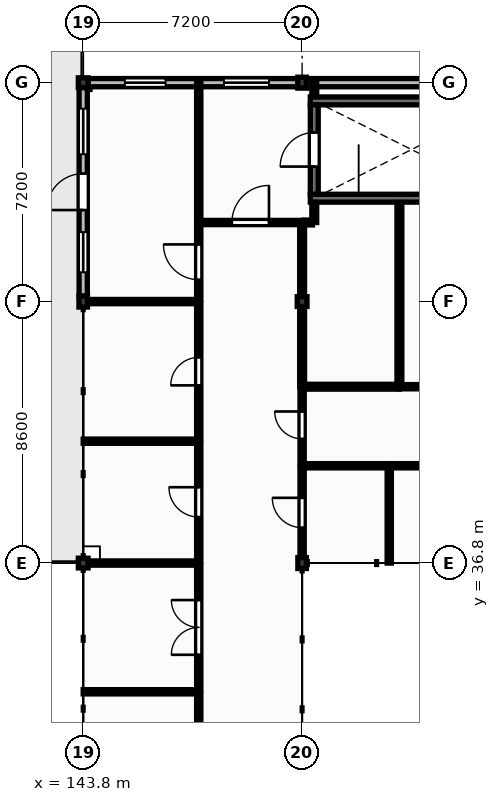
"""IFC4 building model, lengths in metres.
Left out: names, types, materials, properties, quantities, classifications, styles, units other than length and angle.
Written with IfcOpenShell. Run it as: python <this file> out.ifc"""

import sys

from ifc_helpers import new_model, si_unit, direction, frame, frame_2d, origin, origin_2d, place, context, subcontext, project, spatial, rectangle, extrude, element, fill, save


model = new_model("IFC4")
c1 = context("Model", 3, precision=1e-05, world=origin(), true_north=direction((0.0, 1.0)))
c2 = subcontext(c1, "Body", "Model", "MODEL_VIEW")
j1 = project(units=[si_unit("LENGTHUNIT", "METRE"), si_unit("PLANEANGLEUNIT", "RADIAN")], contexts=[c1])
p1 = place(None, origin())
s1 = spatial("IfcSite", under=j1, at=p1, CompositionType="ELEMENT")
p2 = place(p1, origin())
s2 = spatial("IfcBuilding", under=s1, at=p2, CompositionType="ELEMENT")
p3 = place(p2, frame((0.0, 0.0, 9.0)))
s3 = spatial("IfcBuildingStorey", under=s2, at=p3, CompositionType="ELEMENT", Elevation=9.0)
p4 = place(p3, frame((143.8, 36.8, 0.0), z_axis=(0.0, 0.0, 1.0), x_axis=(1.0, 0.0, 0.0)))
e1 = element("IfcColumn", 1, at=p4, inside=s3, PredefinedType="COLUMN", context=c2, shape_type="SweptSolid", body=[
    extrude(rectangle(XDim=0.32, YDim=0.32, at=origin_2d()), origin(), (0.0, 0.0, 1.0), 3.98),
])
p5 = place(p3, frame((143.8, 45.4, 0.0), z_axis=(0.0, 0.0, 1.0), x_axis=(1.0, 0.0, 0.0)))
e2 = element("IfcColumn", 2, at=p5, inside=s3, PredefinedType="COLUMN", context=c2, shape_type="SweptSolid", body=[
    extrude(rectangle(XDim=0.28, YDim=0.36, at=origin_2d()), origin(), (0.0, 0.0, 1.0), 3.98),
])
p6 = place(p3, frame((143.8, 52.6, 0.0), z_axis=(0.0, 0.0, 1.0), x_axis=(1.0, 0.0, 0.0)))
e3 = element("IfcColumn", 3, at=p6, inside=s3, PredefinedType="COLUMN", context=c2, shape_type="SweptSolid", body=[
    extrude(rectangle(XDim=0.32, YDim=0.32, at=origin_2d()), origin(), (0.0, 0.0, 1.0), 3.98),
])
p7 = place(p3, frame((151.0, 36.8, 0.0), z_axis=(0.0, 0.0, 1.0), x_axis=(1.0, 0.0, 0.0)))
e4 = element("IfcColumn", 4, at=p7, inside=s3, PredefinedType="COLUMN", context=c2, shape_type="SweptSolid", body=[
    extrude(rectangle(XDim=0.28, YDim=0.36, at=origin_2d()), origin(), (0.0, 0.0, 1.0), 5.775),
])
p8 = place(p3, frame((151.0, 45.4, 0.0), z_axis=(0.0, 0.0, 1.0), x_axis=(1.0, 0.0, 0.0)))
e5 = element("IfcColumn", 5, at=p8, inside=s3, PredefinedType="COLUMN", context=c2, shape_type="SweptSolid", body=[
    extrude(rectangle(XDim=0.32, YDim=0.32, at=origin_2d()), origin(), (0.0, 0.0, 1.0), 5.775),
])
p9 = place(p3, frame((151.0, 52.6, 0.0), z_axis=(0.0, 0.0, 1.0), x_axis=(1.0, 0.0, 0.0)))
e6 = element("IfcColumn", 6, at=p9, inside=s3, PredefinedType="COLUMN", context=c2, shape_type="SweptSolid", body=[
    extrude(rectangle(XDim=0.28, YDim=0.36, at=origin_2d()), origin(), (0.0, 0.0, 1.0), 5.775),
])
p10 = place(p3, frame((143.96, 52.6, 0.0), z_axis=(0.0, 0.0, 1.0), x_axis=(1.0, 0.0, 0.0)))
e7 = element("IfcWall", 7, at=p10, inside=s3, PredefinedType="SOLIDWALL", context=c2, shape_type="SweptSolid", body=[
    extrude(rectangle(XDim=6.9, YDim=0.27, at=frame_2d((3.45, 0.0))), origin(), (0.0, 0.0, 1.0), 3.54),
])
p11 = place(p10, frame((1.21, 0.0, 1.0)))
e8 = element("IfcOpeningElement", 8, at=p11, cuts=e7, PredefinedType="OPENING", context=c2, shape_type="SweptSolid", body=[
    extrude(rectangle(XDim=1.34, YDim=1.95, at=frame_2d((0.67, 0.975))), frame((0.0, 0.145, 0.0), z_axis=(0.0, -1.0, 0.0), x_axis=(1.0, 0.0, 0.0)), (0.0, 0.0, 1.0), 0.29),
])
p12 = place(p10, frame((4.47, 0.0, 1.0)))
e9 = element("IfcOpeningElement", 9, at=p12, cuts=e7, PredefinedType="OPENING", context=c2, shape_type="SweptSolid", body=[
    extrude(rectangle(XDim=1.48, YDim=1.95, at=frame_2d((0.74, 0.975))), frame((0.0, 0.145, 0.0), z_axis=(0.0, -1.0, 0.0), x_axis=(1.0, 0.0, 0.0)), (0.0, 0.0, 1.0), 0.29),
])
p13 = place(p3, frame((143.8, 45.58, 0.0), z_axis=(0.0, 0.0, 1.0), x_axis=(0.0, 1.0, 0.0)))
e10 = element("IfcWall", 10, at=p13, inside=s3, PredefinedType="SOLIDWALL", context=c2, shape_type="SweptSolid", body=[
    extrude(rectangle(XDim=6.86, YDim=0.27, at=frame_2d((3.43, 0.0))), origin(), (0.0, 0.0, 1.0), 4.0),
])
p14 = place(p13, frame((2.83, 0.0, 0.0)))
e11 = element("IfcOpeningElement", 11, at=p14, cuts=e10, PredefinedType="OPENING", context=c2, shape_type="SweptSolid", body=[
    extrude(rectangle(XDim=1.2, YDim=2.25, at=frame_2d((0.6, 1.125))), frame((0.0, 0.145, 0.0), z_axis=(0.0, -1.0, 0.0), x_axis=(1.0, 0.0, 0.0)), (0.0, 0.0, 1.0), 0.29),
])
p15 = place(p13, frame((0.785, 0.0, 1.5)))
e12 = element("IfcOpeningElement", 12, at=p15, cuts=e10, PredefinedType="OPENING", context=c2, shape_type="SweptSolid", body=[
    extrude(rectangle(XDim=1.32, YDim=1.25, at=frame_2d((0.66, 0.625))), frame((0.0, 0.145, 0.0), z_axis=(0.0, -1.0, 0.0), x_axis=(1.0, 0.0, 0.0)), (0.0, 0.0, 1.0), 0.29),
])
p16 = place(p13, frame((4.665, 0.0, 1.5)))
e13 = element("IfcOpeningElement", 13, at=p16, cuts=e10, PredefinedType="OPENING", context=c2, shape_type="SweptSolid", body=[
    extrude(rectangle(XDim=1.5, YDim=1.25, at=frame_2d((0.75, 0.625))), frame((0.0, 0.145, 0.0), z_axis=(0.0, -1.0, 0.0), x_axis=(1.0, 0.0, 0.0)), (0.0, 0.0, 1.0), 0.29),
])
p17 = place(p3, frame((151.14, 52.6, 0.0), z_axis=(0.0, 0.0, 1.0), x_axis=(1.0, 0.0, 0.0)))
e14 = element("IfcWall", 14, at=p17, inside=s3, PredefinedType="SOLIDWALL", context=c2, shape_type="SweptSolid", body=[
    extrude(rectangle(XDim=6.9, YDim=0.27, at=frame_2d((3.45, 0.0))), origin(), (0.0, 0.0, 1.0), 3.54),
])
for number, where, z_axis, x_axis in (
    (15, (151.27, 48.8, 0.0), (0.0, 0.0, 1.0), (1.0, 0.0, 0.0)),
    (16, (151.27, 52.0, 0.0), (0.0, 0.0, 1.0), (1.0, 0.0, 0.0)),
):
    element("IfcWall", number, at=place(p3, frame(where, z_axis=z_axis, x_axis=x_axis)), inside=s3, PredefinedType="SHEAR", context=c2, shape_type="SweptSolid", body=[
        extrude(rectangle(XDim=6.66, YDim=0.26, at=frame_2d((3.33, 0.0))), origin(), (0.0, 0.0, 1.0), 3.95),
    ])
p18 = place(p3, frame((151.4, 48.93, 0.0), z_axis=(0.0, 0.0, 1.0), x_axis=(0.0, 1.0, 0.0)))
e17 = element("IfcWall", 17, at=p18, inside=s3, PredefinedType="SHEAR", context=c2, shape_type="SweptSolid", body=[
    extrude(rectangle(XDim=2.94, YDim=0.26, at=frame_2d((1.47, 0.0))), origin(), (0.0, 0.0, 1.0), 3.95),
])
p19 = place(p18, frame((0.91, 0.0, 0.0)))
e18 = element("IfcOpeningElement", 18, at=p19, cuts=e17, PredefinedType="OPENING", context=c2, shape_type="SweptSolid", body=[
    extrude(rectangle(XDim=1.12, YDim=2.1, at=frame_2d((0.56, 1.05))), frame((0.0, 0.14, 0.0), z_axis=(0.0, -1.0, 0.0), x_axis=(1.0, 0.0, 0.0)), (0.0, 0.0, 1.0), 0.28),
])
p20 = place(p3, frame((143.8, 32.566, 0.0), z_axis=(0.0, 0.0, 1.0), x_axis=(1.0, 0.0, 0.0)))
e19 = element("IfcWall", 19, at=p20, inside=s3, PredefinedType="PARTITIONING", context=c2, shape_type="SweptSolid", body=[
    extrude(rectangle(XDim=3.8, YDim=0.14, at=frame_2d((1.9, 0.0))), origin(), (0.0, 0.0, 1.0), 3.78),
])
p21 = place(p3, frame((143.96, 36.8, 0.0), z_axis=(0.0, 0.0, 1.0), x_axis=(1.0, 0.0, 0.0)))
e20 = element("IfcWall", 20, at=p21, inside=s3, PredefinedType="PARTITIONING", context=c2, shape_type="SweptSolid", body=[
    extrude(rectangle(XDim=3.64, YDim=0.14, at=frame_2d((1.82, 0.0))), origin(), (0.0, 0.0, 1.0), 3.78),
])
p22 = place(p3, frame((143.8, 40.808, 0.0), z_axis=(0.0, 0.0, 1.0), x_axis=(1.0, 0.0, 0.0)))
e21 = element("IfcWall", 21, at=p22, inside=s3, PredefinedType="PARTITIONING", context=c2, shape_type="SweptSolid", body=[
    extrude(rectangle(XDim=3.8, YDim=0.14, at=frame_2d((1.9, 0.0))), origin(), (0.0, 0.0, 1.0), 3.78),
])
p23 = place(p3, frame((143.94, 45.4, 0.0), z_axis=(0.0, 0.0, 1.0), x_axis=(1.0, 0.0, 0.0)))
e22 = element("IfcWall", 22, at=p23, inside=s3, PredefinedType="PARTITIONING", context=c2, shape_type="SweptSolid", body=[
    extrude(rectangle(XDim=3.66, YDim=0.14, at=frame_2d((1.83, 0.0))), origin(), (0.0, 0.0, 1.0), 3.78),
])
p24 = place(p3, frame((147.6, 27.27, 0.0), z_axis=(0.0, 0.0, 1.0), x_axis=(0.0, 1.0, 0.0)))
e23 = element("IfcWall", 23, at=p24, inside=s3, PredefinedType="PARTITIONING", context=c2, shape_type="SweptSolid", body=[
    extrude(rectangle(XDim=5.226, YDim=0.14, at=frame_2d((2.613, 0.0))), origin(), (0.0, 0.0, 1.0), 3.78),
])
p25 = place(p24, frame((1.713, 0.0, 0.0)))
e24 = element("IfcOpeningElement", 24, at=p25, cuts=e23, PredefinedType="OPENING", context=c2, shape_type="SweptSolid", body=[
    extrude(rectangle(XDim=1.8, YDim=2.3, at=frame_2d((0.9, 1.15))), frame((0.0, 0.08, 0.0), z_axis=(0.0, -1.0, 0.0), x_axis=(1.0, 0.0, 0.0)), (0.0, 0.0, 1.0), 0.16),
])
p26 = place(p3, frame((147.6, 32.636, 0.0), z_axis=(0.0, 0.0, 1.0), x_axis=(0.0, 1.0, 0.0)))
e25 = element("IfcWall", 25, at=p26, inside=s3, PredefinedType="PARTITIONING", context=c2, shape_type="SweptSolid", body=[
    extrude(rectangle(XDim=4.094, YDim=0.14, at=frame_2d((2.047, 0.0))), origin(), (0.0, 0.0, 1.0), 3.78),
])
p27 = place(p26, frame((1.147, 0.0, 0.0)))
e26 = element("IfcOpeningElement", 26, at=p27, cuts=e25, PredefinedType="OPENING", context=c2, shape_type="SweptSolid", body=[
    extrude(rectangle(XDim=1.8, YDim=2.3, at=frame_2d((0.9, 1.15))), frame((0.0, 0.08, 0.0), z_axis=(0.0, -1.0, 0.0), x_axis=(1.0, 0.0, 0.0)), (0.0, 0.0, 1.0), 0.16),
])
p28 = place(p3, frame((147.6, 36.87, 0.0), z_axis=(0.0, 0.0, 1.0), x_axis=(0.0, 1.0, 0.0)))
e27 = element("IfcWall", 27, at=p28, inside=s3, PredefinedType="PARTITIONING", context=c2, shape_type="SweptSolid", body=[
    extrude(rectangle(XDim=3.868, YDim=0.14, at=frame_2d((1.934, 0.0))), origin(), (0.0, 0.0, 1.0), 3.78),
])
p29 = place(p28, frame((1.444, 0.0, 0.0)))
e28 = element("IfcOpeningElement", 28, at=p29, cuts=e27, PredefinedType="OPENING", context=c2, shape_type="SweptSolid", body=[
    extrude(rectangle(XDim=0.98, YDim=2.15, at=frame_2d((0.49, 1.075))), frame((0.0, 0.08, 0.0), z_axis=(0.0, -1.0, 0.0), x_axis=(1.0, 0.0, 0.0)), (0.0, 0.0, 1.0), 0.16),
])
p30 = place(p3, frame((147.6, 40.878, 0.0), z_axis=(0.0, 0.0, 1.0), x_axis=(0.0, 1.0, 0.0)))
e29 = element("IfcWall", 29, at=p30, inside=s3, PredefinedType="PARTITIONING", context=c2, shape_type="SweptSolid", body=[
    extrude(rectangle(XDim=4.452, YDim=0.14, at=frame_2d((2.226, 0.0))), origin(), (0.0, 0.0, 1.0), 3.78),
])
p31 = place(p30, frame((1.766, 0.0, 0.0)))
e30 = element("IfcOpeningElement", 30, at=p31, cuts=e29, PredefinedType="OPENING", context=c2, shape_type="SweptSolid", body=[
    extrude(rectangle(XDim=0.92, YDim=2.1, at=frame_2d((0.46, 1.05))), frame((0.0, 0.08, 0.0), z_axis=(0.0, -1.0, 0.0), x_axis=(1.0, 0.0, 0.0)), (0.0, 0.0, 1.0), 0.16),
])
p32 = place(p3, frame((147.6, 45.47, 0.0), z_axis=(0.0, 0.0, 1.0), x_axis=(0.0, 1.0, 0.0)))
e31 = element("IfcWall", 31, at=p32, inside=s3, PredefinedType="PARTITIONING", context=c2, shape_type="SweptSolid", body=[
    extrude(rectangle(XDim=2.46, YDim=0.14, at=frame_2d((1.23, 0.0))), origin(), (0.0, 0.0, 1.0), 3.78),
])
p33 = place(p32, frame((0.65, 0.0, 0.0)))
e32 = element("IfcOpeningElement", 32, at=p33, cuts=e31, PredefinedType="OPENING", context=c2, shape_type="SweptSolid", body=[
    extrude(rectangle(XDim=1.16, YDim=2.1, at=frame_2d((0.58, 1.05))), frame((0.0, 0.08, 0.0), z_axis=(0.0, -1.0, 0.0), x_axis=(1.0, 0.0, 0.0)), (0.0, 0.0, 1.0), 0.16),
])
p34 = place(p3, frame((147.6, 48.07, 0.0), z_axis=(0.0, 0.0, 1.0), x_axis=(0.0, 1.0, 0.0)))
e33 = element("IfcWall", 33, at=p34, inside=s3, PredefinedType="PARTITIONING", context=c2, shape_type="SweptSolid", body=[
    extrude(rectangle(XDim=4.53, YDim=0.14, at=frame_2d((2.265, 0.0))), origin(), (0.0, 0.0, 1.0), 3.78),
])
p35 = place(p3, frame((147.6, 48.0, 0.0), z_axis=(0.0, 0.0, 1.0), x_axis=(1.0, 0.0, 0.0)))
e34 = element("IfcWall", 34, at=p35, inside=s3, PredefinedType="PARTITIONING", context=c2, shape_type="SweptSolid", body=[
    extrude(rectangle(XDim=3.4, YDim=0.14, at=frame_2d((1.7, 0.0))), origin(), (0.0, 0.0, 1.0), 3.78),
])
p36 = place(p35, frame((1.09, 0.0, 0.0)))
e35 = element("IfcOpeningElement", 35, at=p36, cuts=e34, PredefinedType="OPENING", context=c2, shape_type="SweptSolid", body=[
    extrude(rectangle(XDim=1.22, YDim=2.1, at=frame_2d((0.61, 1.05))), frame((0.0, 0.08, 0.0), z_axis=(0.0, -1.0, 0.0), x_axis=(1.0, 0.0, 0.0)), (0.0, 0.0, 1.0), 0.16),
])
p37 = place(p3, frame((151.0, 36.98, 0.0), z_axis=(0.0, 0.0, 1.0), x_axis=(0.0, 1.0, 0.0)))
e36 = element("IfcWall", 36, at=p37, inside=s3, PredefinedType="PARTITIONING", context=c2, shape_type="SweptSolid", body=[
    extrude(rectangle(XDim=2.95, YDim=0.14, at=frame_2d((1.475, 0.0))), origin(), (0.0, 0.0, 1.0), 3.78),
])
p38 = place(p37, frame((0.985, 0.0, 0.0)))
e37 = element("IfcOpeningElement", 37, at=p38, cuts=e36, PredefinedType="OPENING", context=c2, shape_type="SweptSolid", body=[
    extrude(rectangle(XDim=0.98, YDim=2.15, at=frame_2d((0.49, 1.075))), frame((0.0, 0.08, 0.0), z_axis=(0.0, -1.0, 0.0), x_axis=(1.0, 0.0, 0.0)), (0.0, 0.0, 1.0), 0.16),
])
p39 = place(p3, frame((151.0, 40.07, 0.0), z_axis=(0.0, 0.0, 1.0), x_axis=(0.0, 1.0, 0.0)))
e38 = element("IfcWall", 38, at=p39, inside=s3, PredefinedType="PARTITIONING", context=c2, shape_type="SweptSolid", body=[
    extrude(rectangle(XDim=2.53, YDim=0.14, at=frame_2d((1.265, 0.0))), origin(), (0.0, 0.0, 1.0), 3.78),
])
p40 = place(p39, frame((0.815, 0.0, 0.0)))
e39 = element("IfcOpeningElement", 39, at=p40, cuts=e38, PredefinedType="OPENING", context=c2, shape_type="SweptSolid", body=[
    extrude(rectangle(XDim=0.9, YDim=2.1, at=frame_2d((0.45, 1.05))), frame((0.0, 0.08, 0.0), z_axis=(0.0, -1.0, 0.0), x_axis=(1.0, 0.0, 0.0)), (0.0, 0.0, 1.0), 0.16),
])
p41 = place(p3, frame((151.0, 40.0, 0.0), z_axis=(0.0, 0.0, 1.0), x_axis=(1.0, 0.0, 0.0)))
e40 = element("IfcWall", 40, at=p41, inside=s3, PredefinedType="PARTITIONING", context=c2, shape_type="SweptSolid", body=[
    extrude(rectangle(XDim=2.866, YDim=0.14, at=frame_2d((1.433, 0.0))), origin(), (0.0, 0.0, 1.0), 3.78),
])
p42 = place(p3, frame((153.866, 36.8, 0.0), z_axis=(0.0, 0.0, 1.0), x_axis=(0.0, 1.0, 0.0)))
e41 = element("IfcWall", 41, at=p42, inside=s3, PredefinedType="PARTITIONING", context=c2, shape_type="SweptSolid", body=[
    extrude(rectangle(XDim=3.13, YDim=0.14, at=frame_2d((1.565, 0.0))), origin(), (0.0, 0.0, 1.0), 3.78),
])
p43 = place(p3, frame((153.866, 40.0, 0.0), z_axis=(0.0, 0.0, 1.0), x_axis=(1.0, 0.0, 0.0)))
e42 = element("IfcWall", 42, at=p43, inside=s3, PredefinedType="PARTITIONING", context=c2, shape_type="SweptSolid", body=[
    extrude(rectangle(XDim=4.334, YDim=0.14, at=frame_2d((2.167, 0.0))), origin(), (0.0, 0.0, 1.0), 3.78),
])
p44 = place(p43, frame((1.607, 0.0, 0.0)))
e43 = element("IfcOpeningElement", 43, at=p44, cuts=e42, PredefinedType="OPENING", context=c2, shape_type="SweptSolid", body=[
    extrude(rectangle(XDim=1.12, YDim=2.15, at=frame_2d((0.56, 1.075))), frame((0.0, 0.08, 0.0), z_axis=(0.0, -1.0, 0.0), x_axis=(1.0, 0.0, 0.0)), (0.0, 0.0, 1.0), 0.16),
])
p45 = place(p3, frame((154.2, 42.6, 0.0), z_axis=(0.0, 0.0, 1.0), x_axis=(1.0, 0.0, 0.0)))
e44 = element("IfcWall", 44, at=p45, inside=s3, PredefinedType="PARTITIONING", context=c2, shape_type="SweptSolid", body=[
    extrude(rectangle(XDim=2.6, YDim=0.14, at=frame_2d((1.3, 0.0))), origin(), (0.0, 0.0, 1.0), 3.78),
])
p46 = place(p45, frame((0.69, 0.0, 0.0)))
e45 = element("IfcOpeningElement", 45, at=p46, cuts=e44, PredefinedType="OPENING", context=c2, shape_type="SweptSolid", body=[
    extrude(rectangle(XDim=1.22, YDim=2.1, at=frame_2d((0.61, 1.05))), frame((0.0, 0.08, 0.0), z_axis=(0.0, -1.0, 0.0), x_axis=(1.0, 0.0, 0.0)), (0.0, 0.0, 1.0), 0.16),
])
p47 = place(p3, frame((151.0, 42.6, 0.0), z_axis=(0.0, 0.0, 1.0), x_axis=(0.0, 1.0, 0.0)))
e46 = element("IfcWall", 46, at=p47, inside=s3, PredefinedType="PARTITIONING", context=c2, shape_type="SweptSolid", body=[
    extrude(rectangle(XDim=2.64, YDim=0.16, at=frame_2d((1.32, 0.0))), origin(), (0.0, 0.0, 1.0), 3.78),
])
p48 = place(p3, frame((151.0, 45.56, 0.0), z_axis=(0.0, 0.0, 1.0), x_axis=(0.0, 1.0, 0.0)))
e47 = element("IfcWall", 47, at=p48, inside=s3, PredefinedType="PARTITIONING", context=c2, shape_type="SweptSolid", body=[
    extrude(rectangle(XDim=2.37, YDim=0.16, at=frame_2d((1.185, 0.0))), origin(), (0.0, 0.0, 1.0), 3.78),
])
p49 = place(p3, frame((151.06, 48.0, 0.0), z_axis=(0.0, 0.0, 1.0), x_axis=(1.0, 0.0, 0.0)))
e48 = element("IfcWall", 48, at=p49, inside=s3, PredefinedType="PARTITIONING", context=c2, shape_type="SweptSolid", body=[
    extrude(rectangle(XDim=0.28, YDim=0.16, at=frame_2d((0.14, 0.0))), origin(), (0.0, 0.0, 1.0), 3.78),
])
p50 = place(p3, frame((151.4, 48.0, 0.0), z_axis=(0.0, 0.0, 1.0), x_axis=(0.0, 1.0, 0.0)))
e49 = element("IfcWall", 49, at=p50, inside=s3, PredefinedType="PARTITIONING", context=c2, shape_type="SweptSolid", body=[
    extrude(rectangle(XDim=0.66, YDim=0.16, at=frame_2d((0.33, 0.0))), origin(), (0.0, 0.0, 1.0), 3.78),
])
p51 = place(p3, frame((151.4, 52.14, 0.0), z_axis=(0.0, 0.0, 1.0), x_axis=(0.0, 1.0, 0.0)))
e50 = element("IfcWall", 50, at=p51, inside=s3, PredefinedType="PARTITIONING", context=c2, shape_type="SweptSolid", body=[
    extrude(rectangle(XDim=0.46, YDim=0.16, at=frame_2d((0.23, 0.0))), origin(), (0.0, 0.0, 1.0), 3.78),
])
p52 = place(p3, frame((154.2, 42.6, 0.0), z_axis=(0.0, 0.0, 1.0), x_axis=(-1.0, 0.0, 0.0)))
e51 = element("IfcWall", 51, at=p52, inside=s3, PredefinedType="PARTITIONING", context=c2, shape_type="SweptSolid", body=[
    extrude(rectangle(XDim=3.2, YDim=0.16, at=frame_2d((1.6, 0.0))), origin(), (0.0, 0.0, 1.0), 3.78),
])
p53 = place(p3, frame((154.2, 42.67, 0.0), z_axis=(0.0, 0.0, 1.0), x_axis=(0.0, 1.0, 0.0)))
e52 = element("IfcWall", 52, at=p53, inside=s3, PredefinedType="PARTITIONING", context=c2, shape_type="SweptSolid", body=[
    extrude(rectangle(XDim=5.99, YDim=0.16, at=frame_2d((2.995, 0.0))), origin(), (0.0, 0.0, 1.0), 3.78),
])
p54 = place(p11, origin())
e53 = element("IfcWindow", 53, at=p54, inside=s3, PartitioningType="SINGLE_PANEL", PredefinedType="WINDOW", context=c2, shape_type="SweptSolid", body=[
    extrude(rectangle(XDim=1.34, YDim=1.95, at=frame_2d((0.67, 0.975))), frame((0.0, 0.03, 0.0), z_axis=(0.0, -1.0, 0.0), x_axis=(1.0, 0.0, 0.0)), (0.0, 0.0, 1.0), 0.06),
])
fill(e8, e53)
p55 = place(p12, origin())
e54 = element("IfcWindow", 54, at=p55, inside=s3, PartitioningType="SINGLE_PANEL", PredefinedType="WINDOW", context=c2, shape_type="SweptSolid", body=[
    extrude(rectangle(XDim=1.48, YDim=1.95, at=frame_2d((0.74, 0.975))), frame((0.0, 0.03, 0.0), z_axis=(0.0, -1.0, 0.0), x_axis=(1.0, 0.0, 0.0)), (0.0, 0.0, 1.0), 0.06),
])
fill(e9, e54)
p56 = place(p14, origin())
e55 = element("IfcDoor", 55, at=p56, inside=s3, OperationType="SINGLE_SWING_LEFT", PredefinedType="DOOR", context=c2, shape_type="SweptSolid", body=[
    extrude(rectangle(XDim=1.2, YDim=2.25, at=frame_2d((0.6, 1.125))), frame((0.0, 0.025, 0.0), z_axis=(0.0, -1.0, 0.0), x_axis=(1.0, 0.0, 0.0)), (0.0, 0.0, 1.0), 0.05),
])
fill(e11, e55)
p57 = place(p15, origin())
e56 = element("IfcWindow", 56, at=p57, inside=s3, PartitioningType="SINGLE_PANEL", PredefinedType="WINDOW", context=c2, shape_type="SweptSolid", body=[
    extrude(rectangle(XDim=1.32, YDim=1.25, at=frame_2d((0.66, 0.625))), frame((0.0, 0.03, 0.0), z_axis=(0.0, -1.0, 0.0), x_axis=(1.0, 0.0, 0.0)), (0.0, 0.0, 1.0), 0.06),
])
fill(e12, e56)
p58 = place(p16, origin())
e57 = element("IfcWindow", 57, at=p58, inside=s3, PartitioningType="DOUBLE_PANEL_VERTICAL", PredefinedType="WINDOW", context=c2, shape_type="SweptSolid", body=[
    extrude(rectangle(XDim=1.5, YDim=1.25, at=frame_2d((0.75, 0.625))), frame((0.0, 0.03, 0.0), z_axis=(0.0, -1.0, 0.0), x_axis=(1.0, 0.0, 0.0)), (0.0, 0.0, 1.0), 0.06),
])
fill(e13, e57)
p59 = place(p19, origin())
e58 = element("IfcDoor", 58, at=p59, inside=s3, OperationType="SINGLE_SWING_LEFT", PredefinedType="DOOR", context=c2, shape_type="SweptSolid", body=[
    extrude(rectangle(XDim=1.12, YDim=2.1, at=frame_2d((0.56, 1.05))), frame((0.0, 0.025, 0.0), z_axis=(0.0, -1.0, 0.0), x_axis=(1.0, 0.0, 0.0)), (0.0, 0.0, 1.0), 0.05),
])
fill(e18, e58)
p60 = place(p36, origin())
e59 = element("IfcDoor", 59, at=p60, inside=s3, OperationType="SINGLE_SWING_RIGHT", PredefinedType="DOOR", context=c2, shape_type="SweptSolid", body=[
    extrude(rectangle(XDim=1.22, YDim=2.1, at=frame_2d((0.61, 1.05))), frame((0.0, 0.025, 0.0), z_axis=(0.0, -1.0, 0.0), x_axis=(1.0, 0.0, 0.0)), (0.0, 0.0, 1.0), 0.05),
])
fill(e35, e59)
p61 = place(p40, origin())
e60 = element("IfcDoor", 60, at=p61, inside=s3, OperationType="SINGLE_SWING_RIGHT", PredefinedType="DOOR", context=c2, shape_type="SweptSolid", body=[
    extrude(rectangle(XDim=0.9, YDim=2.1, at=frame_2d((0.45, 1.05))), frame((0.0, 0.025, 0.0), z_axis=(0.0, -1.0, 0.0), x_axis=(1.0, 0.0, 0.0)), (0.0, 0.0, 1.0), 0.05),
])
fill(e39, e60)
p62 = place(p27, origin())
e61 = element("IfcDoor", 61, at=p62, inside=s3, OperationType="DOUBLE_DOOR_SINGLE_SWING", PredefinedType="DOOR", context=c2, shape_type="SweptSolid", body=[
    extrude(rectangle(XDim=1.8, YDim=2.3, at=frame_2d((0.9, 1.15))), frame((0.0, 0.025, 0.0), z_axis=(0.0, -1.0, 0.0), x_axis=(1.0, 0.0, 0.0)), (0.0, 0.0, 1.0), 0.05),
])
fill(e26, e61)
p63 = place(p29, origin())
e62 = element("IfcDoor", 62, at=p63, inside=s3, OperationType="SINGLE_SWING_RIGHT", PredefinedType="DOOR", context=c2, shape_type="SweptSolid", body=[
    extrude(rectangle(XDim=0.98, YDim=2.15, at=frame_2d((0.49, 1.075))), frame((0.0, 0.025, 0.0), z_axis=(0.0, -1.0, 0.0), x_axis=(1.0, 0.0, 0.0)), (0.0, 0.0, 1.0), 0.05),
])
fill(e28, e62)
p64 = place(p31, origin())
e63 = element("IfcDoor", 63, at=p64, inside=s3, OperationType="SINGLE_SWING_LEFT", PredefinedType="DOOR", context=c2, shape_type="SweptSolid", body=[
    extrude(rectangle(XDim=0.92, YDim=2.1, at=frame_2d((0.46, 1.05))), frame((0.0, 0.025, 0.0), z_axis=(0.0, -1.0, 0.0), x_axis=(1.0, 0.0, 0.0)), (0.0, 0.0, 1.0), 0.05),
])
fill(e30, e63)
p65 = place(p33, origin())
e64 = element("IfcDoor", 64, at=p65, inside=s3, OperationType="SINGLE_SWING_RIGHT", PredefinedType="DOOR", context=c2, shape_type="SweptSolid", body=[
    extrude(rectangle(XDim=1.16, YDim=2.1, at=frame_2d((0.58, 1.05))), frame((0.0, 0.025, 0.0), z_axis=(0.0, -1.0, 0.0), x_axis=(1.0, 0.0, 0.0)), (0.0, 0.0, 1.0), 0.05),
])
fill(e32, e64)
p66 = place(p38, origin())
e65 = element("IfcDoor", 65, at=p66, inside=s3, OperationType="SINGLE_SWING_RIGHT", PredefinedType="DOOR", context=c2, shape_type="SweptSolid", body=[
    extrude(rectangle(XDim=0.98, YDim=2.15, at=frame_2d((0.49, 1.075))), frame((0.0, 0.025, 0.0), z_axis=(0.0, -1.0, 0.0), x_axis=(1.0, 0.0, 0.0)), (0.0, 0.0, 1.0), 0.05),
])
fill(e37, e65)
save(model, sys.argv[1])
